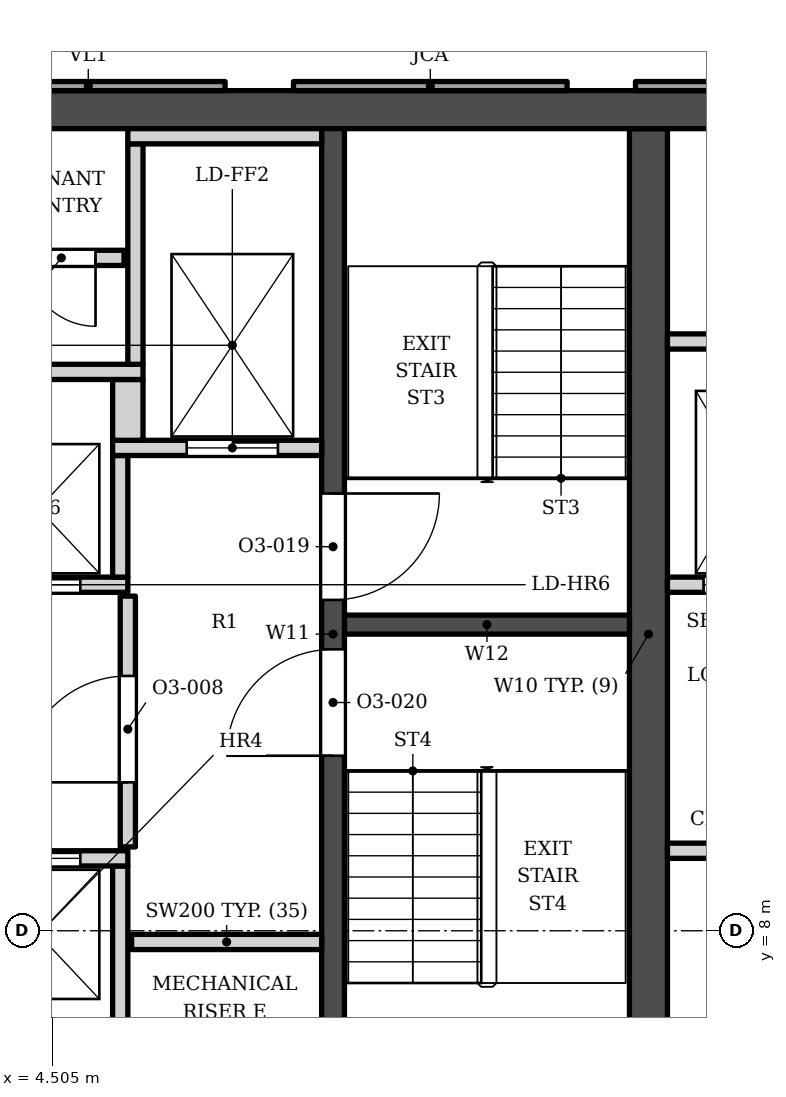
"""IFC4 building model, lengths in metres.
Left out: names, types, materials, properties, quantities, classifications, styles, units other than length and angle.
Written with IfcOpenShell. Run it as: python <this file> out.ifc"""

import sys

from ifc_helpers import new_model, si_unit, direction, frame, frame_2d, origin, place, context, subcontext, project, spatial, polyline, rectangle, outline, extrude, element, fill, save


model = new_model("IFC4")
c1 = context("Model", 3, precision=1e-05, world=origin(), true_north=direction((0.0, 1.0)))
c2 = subcontext(c1, "Body", "Model", "MODEL_VIEW")
j1 = project(units=[si_unit("LENGTHUNIT", "METRE"), si_unit("PLANEANGLEUNIT", "RADIAN")], contexts=[c1])
p1 = place(None, origin())
s1 = spatial("IfcSite", under=j1, at=p1, CompositionType="ELEMENT")
p2 = place(p1, origin())
s2 = spatial("IfcBuilding", under=s1, at=p2, CompositionType="ELEMENT")
p3 = place(p2, frame((0.0, 0.0, 168.0)))
s3 = spatial("IfcBuildingStorey", under=s2, at=p3, CompositionType="ELEMENT", Elevation=168.0)
p4 = place(p3, frame((-15.1, 18.802, 0.0), z_axis=(0.0, 0.0, 1.0), x_axis=(1.0, 0.0, 0.0)))
e1 = element("IfcWall", 1, at=p4, inside=s3, PredefinedType="SHEAR", context=c2, shape_type="SweptSolid", body=[
    extrude(rectangle(XDim=30.2, YDim=0.5, at=frame_2d((15.1, 0.0))), origin(), (0.0, 0.0, 1.0), 3.9),
])
p5 = place(p3, frame((12.35, 5.253, 0.0), z_axis=(0.0, 0.0, 1.0), x_axis=(0.0, 1.0, 0.0)))
e2 = element("IfcWall", 2, at=p5, inside=s3, PredefinedType="SHEAR", context=c2, shape_type="SweptSolid", body=[
    extrude(rectangle(XDim=13.3, YDim=0.5, at=frame_2d((6.65, 0.0))), origin(), (0.0, 0.0, 1.0), 3.9),
])
p6 = place(p3, frame((8.2, 5.253, 0.0), z_axis=(0.0, 0.0, 1.0), x_axis=(0.0, 1.0, 0.0)))
e3 = element("IfcWall", 3, at=p6, inside=s3, PredefinedType="SHEAR", context=c2, shape_type="SweptSolid", body=[
    extrude(rectangle(XDim=13.3, YDim=0.3, at=frame_2d((6.65, 0.0))), origin(), (0.0, 0.0, 1.0), 3.9),
])
p7 = place(p6, frame((7.1, 0.0, 0.0)))
e4 = element("IfcOpeningElement", 4, at=p7, cuts=e3, PredefinedType="OPENING", context=c2, shape_type="SweptSolid", body=[
    extrude(rectangle(XDim=1.4, YDim=2.1, at=frame_2d((0.7, 1.05))), frame((0.0, 0.16, 0.0), z_axis=(0.0, -1.0, 0.0), x_axis=(1.0, 0.0, 0.0)), (0.0, 0.0, 1.0), 0.32),
])
p8 = place(p6, frame((5.05, 0.0, 0.0)))
e5 = element("IfcOpeningElement", 5, at=p8, cuts=e3, PredefinedType="OPENING", context=c2, shape_type="SweptSolid", body=[
    extrude(rectangle(XDim=1.4, YDim=2.1, at=frame_2d((0.7, 1.05))), frame((0.0, 0.16, 0.0), z_axis=(0.0, -1.0, 0.0), x_axis=(1.0, 0.0, 0.0)), (0.0, 0.0, 1.0), 0.32),
])
p9 = place(p3, frame((8.35, 12.028, 0.0), z_axis=(0.0, 0.0, 1.0), x_axis=(1.0, 0.0, 0.0)))
e6 = element("IfcWall", 6, at=p9, inside=s3, PredefinedType="SHEAR", context=c2, shape_type="SweptSolid", body=[
    extrude(rectangle(XDim=3.75, YDim=0.25, at=frame_2d((1.875, 0.0))), origin(), (0.0, 0.0, 1.0), 3.9),
])
p10 = place(p3, origin())
e7 = element("IfcWall", 7, at=p10, inside=s3, PredefinedType="ELEMENTEDWALL", context=c2, shape_type="SweptSolid", body=[
    extrude(outline(polyline([(12.18, 19.173), (12.18, 19.052), (15.319, 19.052), (15.424, 19.173), (12.18, 19.173)])), origin(), (0.0, 0.0, 1.0), 3.0),
])
p11 = place(p3, origin())
e8 = element("IfcWall", 8, at=p11, inside=s3, PredefinedType="SOLIDWALL", context=c2, shape_type="SweptSolid", body=[
    extrude(outline(polyline([(7.68, 19.173), (7.68, 19.052), (11.28, 19.052), (11.28, 19.173), (7.68, 19.173)])), origin(), (0.0, 0.0, 1.0), 3.0),
])
p12 = place(p3, origin())
e9 = element("IfcWall", 9, at=p12, inside=s3, PredefinedType="ELEMENTEDWALL", context=c2, shape_type="SweptSolid", body=[
    extrude(outline(polyline([(3.18, 19.173), (3.18, 19.052), (6.78, 19.052), (6.78, 19.173), (3.18, 19.173)])), origin(), (0.0, 0.0, 1.0), 3.0),
])
for number, where, z_axis, x_axis in (
    (10, (5.4, 6.353, 0.0), (0.0, 0.0, 1.0), (0.0, 1.0, 0.0)),
    (11, (5.55, 7.853, 0.0), (0.0, 0.0, 1.0), (1.0, 0.0, 0.0)),
):
    element("IfcWall", number, at=place(p3, frame(where, z_axis=z_axis, x_axis=x_axis)), inside=s3, PredefinedType="SOLIDWALL", context=c2, shape_type="SweptSolid", body=[
        extrude(rectangle(XDim=2.5, YDim=0.2, at=frame_2d((1.25, 0.0))), origin(), (0.0, 0.0, 1.0), 3.73),
    ])
p13 = place(p3, frame((1.0, 8.953, 0.0), z_axis=(0.0, 0.0, 1.0), x_axis=(1.0, 0.0, 0.0)))
e12 = element("IfcWall", 12, at=p13, inside=s3, PredefinedType="SOLIDWALL", context=c2, shape_type="SweptSolid", body=[
    extrude(rectangle(XDim=4.5, YDim=0.2, at=frame_2d((2.25, 0.0))), origin(), (0.0, 0.0, 1.0), 3.73),
])
p14 = place(p13, frame((0.625, 0.0, 0.0)))
e13 = element("IfcOpeningElement", 13, at=p14, cuts=e12, PredefinedType="OPENING", context=c2, shape_type="SweptSolid", body=[
    extrude(rectangle(XDim=1.1, YDim=2.1, at=frame_2d((0.55, 1.05))), frame((0.0, 0.11, 0.0), z_axis=(0.0, -1.0, 0.0), x_axis=(1.0, 0.0, 0.0)), (0.0, 0.0, 1.0), 0.22),
])
p15 = place(p13, frame((2.775, 0.0, 0.0)))
e14 = element("IfcOpeningElement", 14, at=p15, cuts=e12, PredefinedType="OPENING", context=c2, shape_type="SweptSolid", body=[
    extrude(rectangle(XDim=1.1, YDim=2.1, at=frame_2d((0.55, 1.05))), frame((0.0, 0.11, 0.0), z_axis=(0.0, -1.0, 0.0), x_axis=(1.0, 0.0, 0.0)), (0.0, 0.0, 1.0), 0.22),
])
p16 = place(p3, frame((12.6, 9.052, 0.0), z_axis=(0.0, 0.0, 1.0), x_axis=(1.0, 0.0, 0.0)))
e15 = element("IfcWall", 15, at=p16, inside=s3, PredefinedType="PARTITIONING", context=c2, shape_type="SweptSolid", body=[
    extrude(rectangle(XDim=2.5, YDim=0.2, at=frame_2d((1.25, 0.0))), origin(), (0.0, 0.0, 1.0), 3.73),
])
p17 = place(p3, frame((5.5, 9.103, 0.0), z_axis=(0.0, 0.0, 1.0), x_axis=(0.0, 1.0, 0.0)))
e16 = element("IfcWall", 16, at=p17, inside=s3, PredefinedType="SOLIDWALL", context=c2, shape_type="SweptSolid", body=[
    extrude(rectangle(XDim=3.3, YDim=0.2, at=frame_2d((1.65, 0.0))), origin(), (0.0, 0.0, 1.0), 3.73),
])
p18 = place(p17, frame((0.85, 0.0, 0.0)))
e17 = element("IfcOpeningElement", 17, at=p18, cuts=e16, PredefinedType="OPENING", context=c2, shape_type="SweptSolid", body=[
    extrude(rectangle(XDim=1.4, YDim=2.1, at=frame_2d((0.7, 1.05))), frame((0.0, 0.11, 0.0), z_axis=(0.0, -1.0, 0.0), x_axis=(1.0, 0.0, 0.0)), (0.0, 0.0, 1.0), 0.22),
])
p19 = place(p3, frame((-1.5, 12.552, 0.0), z_axis=(0.0, 0.0, 1.0), x_axis=(1.0, 0.0, 0.0)))
e18 = element("IfcWall", 18, at=p19, inside=s3, PredefinedType="SOLIDWALL", context=c2, shape_type="SweptSolid", body=[
    extrude(rectangle(XDim=7.0, YDim=0.2, at=frame_2d((3.5, 0.0))), origin(), (0.0, 0.0, 1.0), 3.73),
])
p20 = place(p19, frame((3.075, 0.0, 0.0)))
e19 = element("IfcOpeningElement", 19, at=p20, cuts=e18, PredefinedType="OPENING", context=c2, shape_type="SweptSolid", body=[
    extrude(rectangle(XDim=1.1, YDim=2.1, at=frame_2d((0.55, 1.05))), frame((0.0, 0.11, 0.0), z_axis=(0.0, -1.0, 0.0), x_axis=(1.0, 0.0, 0.0)), (0.0, 0.0, 1.0), 0.22),
])
p21 = place(p19, frame((5.275, 0.0, 0.0)))
e20 = element("IfcOpeningElement", 20, at=p21, cuts=e18, PredefinedType="OPENING", context=c2, shape_type="SweptSolid", body=[
    extrude(rectangle(XDim=1.1, YDim=2.1, at=frame_2d((0.55, 1.05))), frame((0.0, 0.11, 0.0), z_axis=(0.0, -1.0, 0.0), x_axis=(1.0, 0.0, 0.0)), (0.0, 0.0, 1.0), 0.22),
])
p22 = place(p3, frame((12.6, 12.552, 0.0), z_axis=(0.0, 0.0, 1.0), x_axis=(1.0, 0.0, 0.0)))
e21 = element("IfcWall", 21, at=p22, inside=s3, PredefinedType="SOLIDWALL", context=c2, shape_type="SweptSolid", body=[
    extrude(rectangle(XDim=2.15, YDim=0.2, at=frame_2d((1.075, 0.0))), origin(), (0.0, 0.0, 1.0), 3.73),
])
p23 = place(p22, frame((0.475, 0.0, 0.0)))
e22 = element("IfcOpeningElement", 22, at=p23, cuts=e21, PredefinedType="OPENING", context=c2, shape_type="SweptSolid", body=[
    extrude(rectangle(XDim=1.2, YDim=2.1, at=frame_2d((0.6, 1.05))), frame((0.0, 0.11, 0.0), z_axis=(0.0, -1.0, 0.0), x_axis=(1.0, 0.0, 0.0)), (0.0, 0.0, 1.0), 0.22),
])
p24 = place(p3, frame((5.4, 12.653, 0.0), z_axis=(0.0, 0.0, 1.0), x_axis=(0.0, 1.0, 0.0)))
e23 = element("IfcWall", 23, at=p24, inside=s3, PredefinedType="SOLIDWALL", context=c2, shape_type="SweptSolid", body=[
    extrude(rectangle(XDim=1.6, YDim=0.2, at=frame_2d((0.8, 0.0))), origin(), (0.0, 0.0, 1.0), 3.73),
])
p25 = place(p3, frame((5.3, 14.353, 0.0), z_axis=(0.0, 0.0, 1.0), x_axis=(1.0, 0.0, 0.0)))
e24 = element("IfcWall", 24, at=p25, inside=s3, PredefinedType="SOLIDWALL", context=c2, shape_type="SweptSolid", body=[
    extrude(rectangle(XDim=2.75, YDim=0.2, at=frame_2d((1.375, 0.0))), origin(), (0.0, 0.0, 1.0), 3.73),
])
p26 = place(p25, frame((0.975, 0.0, 0.0)))
e25 = element("IfcOpeningElement", 25, at=p26, cuts=e24, PredefinedType="OPENING", context=c2, shape_type="SweptSolid", body=[
    extrude(rectangle(XDim=1.2, YDim=2.1, at=frame_2d((0.6, 1.05))), frame((0.0, 0.11, 0.0), z_axis=(0.0, -1.0, 0.0), x_axis=(1.0, 0.0, 0.0)), (0.0, 0.0, 1.0), 0.22),
])
p27 = place(p3, frame((5.5, 14.453, 0.0), z_axis=(0.0, 0.0, 1.0), x_axis=(0.0, 1.0, 0.0)))
e26 = element("IfcWall", 26, at=p27, inside=s3, PredefinedType="SOLIDWALL", context=c2, shape_type="SweptSolid", body=[
    extrude(rectangle(XDim=0.8, YDim=0.4, at=frame_2d((0.4, 0.0))), origin(), (0.0, 0.0, 1.0), 3.73),
])
p28 = place(p3, frame((-1.5, 15.353, 0.0), z_axis=(0.0, 0.0, 1.0), x_axis=(1.0, 0.0, 0.0)))
e27 = element("IfcWall", 27, at=p28, inside=s3, PredefinedType="SOLIDWALL", context=c2, shape_type="SweptSolid", body=[
    extrude(rectangle(XDim=7.2, YDim=0.2, at=frame_2d((3.6, 0.0))), origin(), (0.0, 0.0, 1.0), 3.73),
])
p29 = place(p3, frame((5.6, 15.453, 0.0), z_axis=(0.0, 0.0, 1.0), x_axis=(0.0, 1.0, 0.0)))
e28 = element("IfcWall", 28, at=p29, inside=s3, PredefinedType="SOLIDWALL", context=c2, shape_type="SweptSolid", body=[
    extrude(rectangle(XDim=2.9, YDim=0.2, at=frame_2d((1.45, 0.0))), origin(), (0.0, 0.0, 1.0), 3.73),
])
p30 = place(p3, frame((12.6, 15.753, 0.0), z_axis=(0.0, 0.0, 1.0), x_axis=(1.0, 0.0, 0.0)))
e29 = element("IfcWall", 29, at=p30, inside=s3, PredefinedType="SOLIDWALL", context=c2, shape_type="SweptSolid", body=[
    extrude(rectangle(XDim=2.15, YDim=0.2, at=frame_2d((1.075, 0.0))), origin(), (0.0, 0.0, 1.0), 3.73),
])
p31 = place(p3, frame((-1.6, 16.853, 0.0), z_axis=(0.0, 0.0, 1.0), x_axis=(1.0, 0.0, 0.0)))
e30 = element("IfcWall", 30, at=p31, inside=s3, PredefinedType="SOLIDWALL", context=c2, shape_type="SweptSolid", body=[
    extrude(rectangle(XDim=7.05, YDim=0.2, at=frame_2d((3.525, 0.0))), origin(), (0.0, 0.0, 1.0), 3.73),
])
p32 = place(p31, frame((0.525, 0.0, 0.0)))
e31 = element("IfcOpeningElement", 31, at=p32, cuts=e30, PredefinedType="OPENING", context=c2, shape_type="SweptSolid", body=[
    extrude(rectangle(XDim=0.9, YDim=2.1, at=frame_2d((0.45, 1.05))), frame((0.0, 0.11, 0.0), z_axis=(0.0, -1.0, 0.0), x_axis=(1.0, 0.0, 0.0)), (0.0, 0.0, 1.0), 0.22),
])
p33 = place(p31, frame((3.15, 0.0, 0.0)))
e32 = element("IfcOpeningElement", 32, at=p33, cuts=e30, PredefinedType="OPENING", context=c2, shape_type="SweptSolid", body=[
    extrude(rectangle(XDim=0.9, YDim=2.1, at=frame_2d((0.45, 1.05))), frame((0.0, 0.11, 0.0), z_axis=(0.0, -1.0, 0.0), x_axis=(1.0, 0.0, 0.0)), (0.0, 0.0, 1.0), 0.22),
])
p34 = place(p31, frame((5.775, 0.0, 0.0)))
e33 = element("IfcOpeningElement", 33, at=p34, cuts=e30, PredefinedType="OPENING", context=c2, shape_type="SweptSolid", body=[
    extrude(rectangle(XDim=0.9, YDim=2.1, at=frame_2d((0.45, 1.05))), frame((0.0, 0.11, 0.0), z_axis=(0.0, -1.0, 0.0), x_axis=(1.0, 0.0, 0.0)), (0.0, 0.0, 1.0), 0.22),
])
p35 = place(p3, frame((5.5, 18.453, 0.0), z_axis=(0.0, 0.0, 1.0), x_axis=(1.0, 0.0, 0.0)))
e34 = element("IfcWall", 34, at=p35, inside=s3, PredefinedType="SOLIDWALL", context=c2, shape_type="SweptSolid", body=[
    extrude(rectangle(XDim=2.55, YDim=0.2, at=frame_2d((1.275, 0.0))), origin(), (0.0, 0.0, 1.0), 3.73),
])
p36 = place(p15, origin())
e35 = element("IfcDoor", 35, at=p36, inside=s3, OperationType="DOUBLE_DOOR_SLIDING", PredefinedType="DOOR", context=c2, shape_type="SweptSolid", body=[
    extrude(rectangle(XDim=1.1, YDim=2.1, at=frame_2d((0.55, 1.05))), frame((0.0, 0.025, 0.0), z_axis=(0.0, -1.0, 0.0), x_axis=(1.0, 0.0, 0.0)), (0.0, 0.0, 1.0), 0.05),
])
fill(e14, e35)
p37 = place(p21, origin())
e36 = element("IfcDoor", 36, at=p37, inside=s3, OperationType="DOUBLE_DOOR_SLIDING", PredefinedType="DOOR", context=c2, shape_type="SweptSolid", body=[
    extrude(rectangle(XDim=1.1, YDim=2.1, at=frame_2d((0.55, 1.05))), frame((0.0, 0.025, 0.0), z_axis=(0.0, -1.0, 0.0), x_axis=(1.0, 0.0, 0.0)), (0.0, 0.0, 1.0), 0.05),
])
fill(e20, e36)
p38 = place(p26, origin())
e37 = element("IfcDoor", 37, at=p38, inside=s3, OperationType="DOUBLE_DOOR_SLIDING", PredefinedType="DOOR", context=c2, shape_type="SweptSolid", body=[
    extrude(rectangle(XDim=1.2, YDim=2.1, at=frame_2d((0.6, 1.05))), frame((0.0, 0.025, 0.0), z_axis=(0.0, -1.0, 0.0), x_axis=(1.0, 0.0, 0.0)), (0.0, 0.0, 1.0), 0.05),
])
fill(e25, e37)
p39 = place(p23, origin())
e38 = element("IfcDoor", 38, at=p39, inside=s3, OperationType="DOUBLE_DOOR_SLIDING", PredefinedType="DOOR", context=c2, shape_type="SweptSolid", body=[
    extrude(rectangle(XDim=1.2, YDim=2.1, at=frame_2d((0.6, 1.05))), frame((0.0, 0.025, 0.0), z_axis=(0.0, -1.0, 0.0), x_axis=(1.0, 0.0, 0.0)), (0.0, 0.0, 1.0), 0.05),
])
fill(e22, e38)
p40 = place(p7, origin())
e39 = element("IfcDoor", 39, at=p40, inside=s3, OperationType="SINGLE_SWING_RIGHT", PredefinedType="DOOR", context=c2, shape_type="SweptSolid", body=[
    extrude(rectangle(XDim=1.4, YDim=2.1, at=frame_2d((0.7, 1.05))), frame((0.0, 0.025, 0.0), z_axis=(0.0, -1.0, 0.0), x_axis=(1.0, 0.0, 0.0)), (0.0, 0.0, 1.0), 0.05),
])
fill(e4, e39)
p41 = place(p8, origin())
e40 = element("IfcDoor", 40, at=p41, inside=s3, OperationType="SINGLE_SWING_LEFT", PredefinedType="DOOR", context=c2, shape_type="SweptSolid", body=[
    extrude(rectangle(XDim=1.4, YDim=2.1, at=frame_2d((0.7, 1.05))), frame((0.0, 0.025, 0.0), z_axis=(0.0, -1.0, 0.0), x_axis=(1.0, 0.0, 0.0)), (0.0, 0.0, 1.0), 0.05),
])
fill(e5, e40)
p42 = place(p18, origin())
e41 = element("IfcDoor", 41, at=p42, inside=s3, OperationType="SINGLE_SWING_LEFT", PredefinedType="DOOR", context=c2, shape_type="SweptSolid", body=[
    extrude(rectangle(XDim=1.4, YDim=2.1, at=frame_2d((0.7, 1.05))), frame((0.0, 0.025, 0.0), z_axis=(0.0, -1.0, 0.0), x_axis=(1.0, 0.0, 0.0)), (0.0, 0.0, 1.0), 0.05),
])
fill(e17, e41)
p43 = place(p34, origin())
e42 = element("IfcDoor", 42, at=p43, inside=s3, OperationType="SINGLE_SWING_RIGHT", PredefinedType="DOOR", context=c2, shape_type="SweptSolid", body=[
    extrude(rectangle(XDim=0.9, YDim=2.1, at=frame_2d((0.45, 1.05))), frame((0.0, 0.025, 0.0), z_axis=(0.0, -1.0, 0.0), x_axis=(1.0, 0.0, 0.0)), (0.0, 0.0, 1.0), 0.05),
])
fill(e33, e42)
save(model, sys.argv[1])
